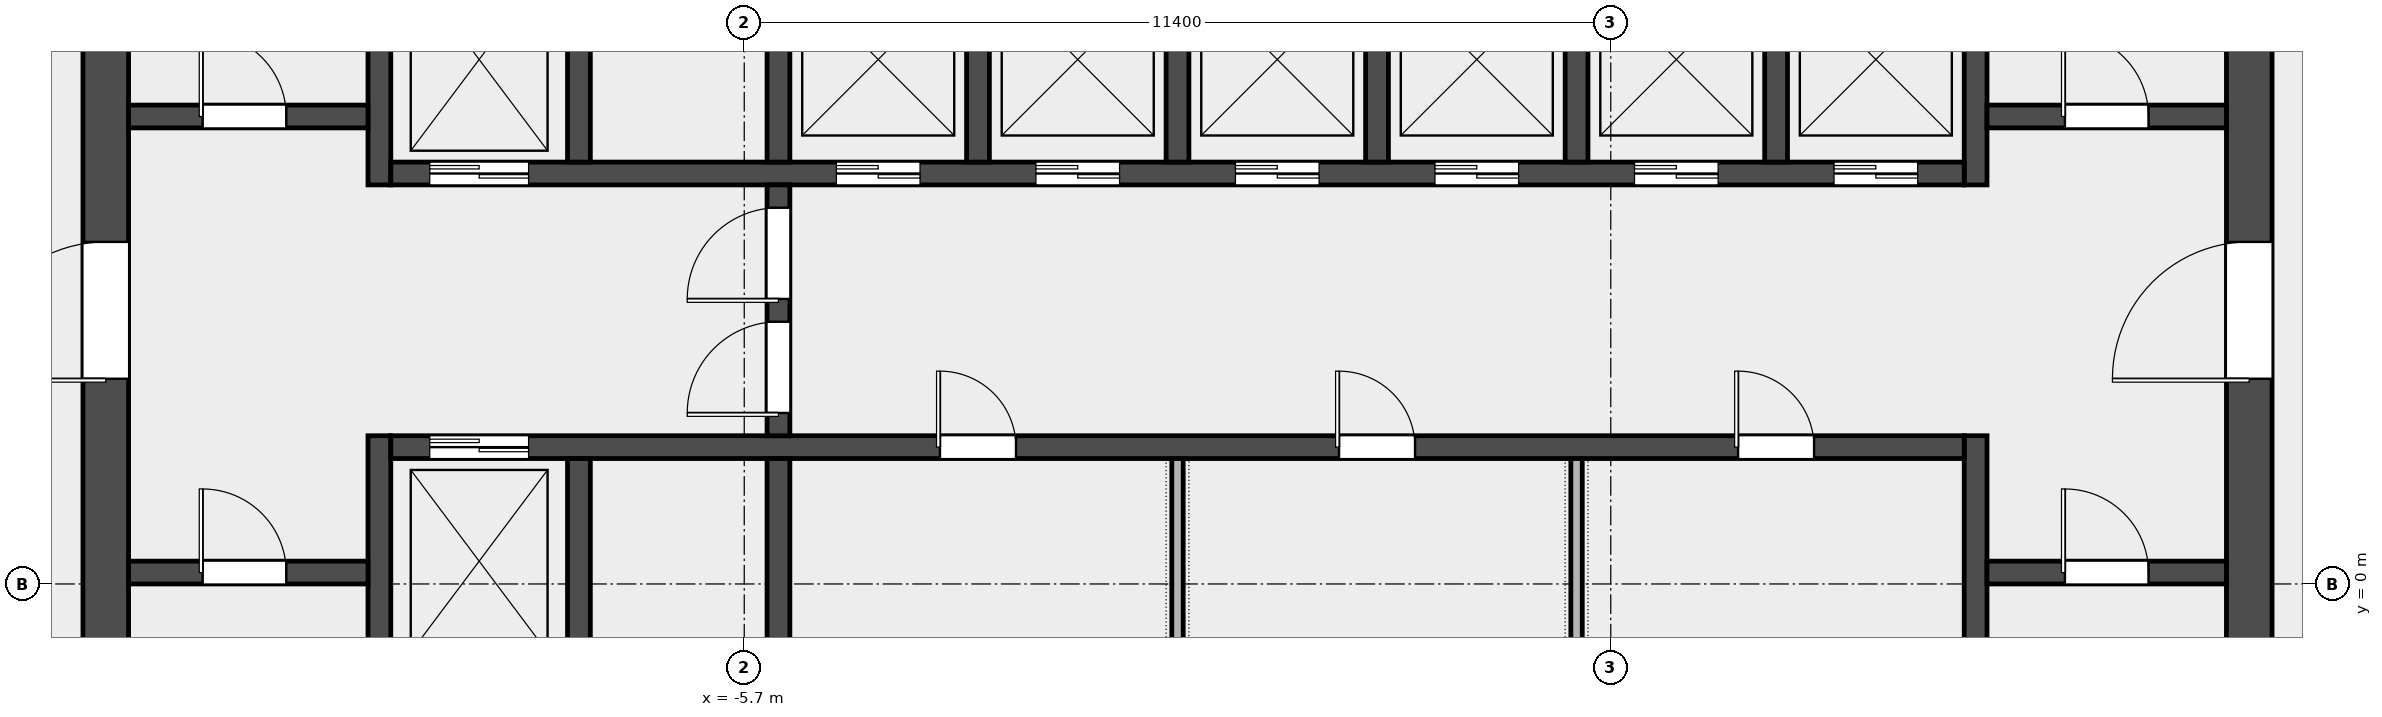
"""IFC4 building model, lengths in metres.
Left out: names, types, materials, properties, quantities, classifications, styles, units other than length and angle.
Written with IfcOpenShell. Run it as: python <this file> out.ifc"""

import sys

from ifc_helpers import new_model, si_unit, direction, frame, frame_2d, origin, place, context, subcontext, project, spatial, rectangle, extrude, element, fill, save


model = new_model("IFC4")
c1 = context("Model", 3, precision=1e-05, world=origin(), true_north=direction((0.0, 1.0)))
c2 = subcontext(c1, "Body", "Model", "MODEL_VIEW")
j1 = project(units=[si_unit("LENGTHUNIT", "METRE"), si_unit("PLANEANGLEUNIT", "RADIAN")], contexts=[c1])
p1 = place(None, origin())
s1 = spatial("IfcSite", under=j1, at=p1, CompositionType="ELEMENT")
p2 = place(p1, origin())
s2 = spatial("IfcBuilding", under=s1, at=p2, CompositionType="ELEMENT")
p3 = place(p2, frame((0.0, 0.0, 271.4)))
s3 = spatial("IfcBuildingStorey", under=s2, at=p3, CompositionType="ELEMENT", Elevation=271.4)
p4 = place(p3, frame((-14.1, -6.6, 0.0), z_axis=(0.0, 0.0, 1.0), x_axis=(0.0, 1.0, 0.0)))
e1 = element("IfcWall", 1, at=p4, inside=s3, PredefinedType="SHEAR", context=c2, shape_type="SweptSolid", body=[
    extrude(rectangle(XDim=19.5, YDim=0.6, at=frame_2d((9.75, 0.0))), origin(), (0.0, 0.0, 1.0), 3.7),
])
p5 = place(p4, frame((9.3, 0.0, 0.0)))
e2 = element("IfcOpeningElement", 2, at=p5, cuts=e1, PredefinedType="OPENING", context=c2, shape_type="SweptSolid", body=[
    extrude(rectangle(XDim=1.8, YDim=2.1, at=frame_2d((0.9, 1.05))), frame((0.0, 0.312, 0.0), z_axis=(0.0, -1.0, 0.0), x_axis=(1.0, 0.0, 0.0)), (0.0, 0.0, 1.0), 0.624),
])
p6 = place(p3, frame((14.1, -6.6, 0.0), z_axis=(0.0, 0.0, 1.0), x_axis=(0.0, 1.0, 0.0)))
e3 = element("IfcWall", 3, at=p6, inside=s3, PredefinedType="SHEAR", context=c2, shape_type="SweptSolid", body=[
    extrude(rectangle(XDim=19.5, YDim=0.6, at=frame_2d((9.75, 0.0))), origin(), (0.0, 0.0, 1.0), 3.7),
])
p7 = place(p6, frame((9.3, 0.0, 0.0)))
e4 = element("IfcOpeningElement", 4, at=p7, cuts=e3, PredefinedType="OPENING", context=c2, shape_type="SweptSolid", body=[
    extrude(rectangle(XDim=1.8, YDim=2.1, at=frame_2d((0.9, 1.05))), frame((0.0, 0.312, 0.0), z_axis=(0.0, -1.0, 0.0), x_axis=(1.0, 0.0, 0.0)), (0.0, 0.0, 1.0), 0.624),
])
p8 = place(p3, frame((-10.5, -6.6, 0.0), z_axis=(0.0, 0.0, 1.0), x_axis=(0.0, 1.0, 0.0)))
e5 = element("IfcWall", 5, at=p8, inside=s3, PredefinedType="SHEAR", context=c2, shape_type="SweptSolid", body=[
    extrude(rectangle(XDim=8.55, YDim=0.3, at=frame_2d((4.275, 0.0))), origin(), (0.0, 0.0, 1.0), 3.7),
])
p9 = place(p3, frame((-10.5, 5.25, 0.0), z_axis=(0.0, 0.0, 1.0), x_axis=(0.0, 1.0, 0.0)))
e6 = element("IfcWall", 6, at=p9, inside=s3, PredefinedType="SHEAR", context=c2, shape_type="SweptSolid", body=[
    extrude(rectangle(XDim=7.65, YDim=0.3, at=frame_2d((3.825, 0.0))), origin(), (0.0, 0.0, 1.0), 3.7),
])
p10 = place(p3, frame((10.5, -6.6, 0.0), z_axis=(0.0, 0.0, 1.0), x_axis=(0.0, 1.0, 0.0)))
e7 = element("IfcWall", 7, at=p10, inside=s3, PredefinedType="SHEAR", context=c2, shape_type="SweptSolid", body=[
    extrude(rectangle(XDim=8.55, YDim=0.3, at=frame_2d((4.275, 0.0))), origin(), (0.0, 0.0, 1.0), 3.7),
])
p11 = place(p3, frame((10.5, 5.25, 0.0), z_axis=(0.0, 0.0, 1.0), x_axis=(0.0, 1.0, 0.0)))
e8 = element("IfcWall", 8, at=p11, inside=s3, PredefinedType="SHEAR", context=c2, shape_type="SweptSolid", body=[
    extrude(rectangle(XDim=7.65, YDim=0.3, at=frame_2d((3.825, 0.0))), origin(), (0.0, 0.0, 1.0), 3.7),
])
p12 = place(p3, frame((-13.8, 0.15, 0.0), z_axis=(0.0, 0.0, 1.0), x_axis=(1.0, 0.0, 0.0)))
e9 = element("IfcWall", 9, at=p12, inside=s3, PredefinedType="SOLIDWALL", context=c2, shape_type="SweptSolid", body=[
    extrude(rectangle(XDim=3.15, YDim=0.3, at=frame_2d((1.575, 0.0))), origin(), (0.0, 0.0, 1.0), 3.7),
])
p13 = place(p12, frame((0.975, 0.0, 0.0)))
e10 = element("IfcOpeningElement", 10, at=p13, cuts=e9, PredefinedType="OPENING", context=c2, shape_type="SweptSolid", body=[
    extrude(rectangle(XDim=1.1, YDim=2.1, at=frame_2d((0.55, 1.05))), frame((0.0, 0.162, 0.0), z_axis=(0.0, -1.0, 0.0), x_axis=(1.0, 0.0, 0.0)), (0.0, 0.0, 1.0), 0.324),
])
p14 = place(p3, frame((-13.8, 6.15, 0.0), z_axis=(0.0, 0.0, 1.0), x_axis=(1.0, 0.0, 0.0)))
e11 = element("IfcWall", 11, at=p14, inside=s3, PredefinedType="SOLIDWALL", context=c2, shape_type="SweptSolid", body=[
    extrude(rectangle(XDim=3.15, YDim=0.3, at=frame_2d((1.575, 0.0))), origin(), (0.0, 0.0, 1.0), 3.7),
])
p15 = place(p14, frame((0.975, 0.0, 0.0)))
e12 = element("IfcOpeningElement", 12, at=p15, cuts=e11, PredefinedType="OPENING", context=c2, shape_type="SweptSolid", body=[
    extrude(rectangle(XDim=1.1, YDim=2.1, at=frame_2d((0.55, 1.05))), frame((0.0, 0.162, 0.0), z_axis=(0.0, -1.0, 0.0), x_axis=(1.0, 0.0, 0.0)), (0.0, 0.0, 1.0), 0.324),
])
p16 = place(p3, frame((10.65, 0.15, 0.0), z_axis=(0.0, 0.0, 1.0), x_axis=(1.0, 0.0, 0.0)))
e13 = element("IfcWall", 13, at=p16, inside=s3, PredefinedType="SOLIDWALL", context=c2, shape_type="SweptSolid", body=[
    extrude(rectangle(XDim=3.15, YDim=0.3, at=frame_2d((1.575, 0.0))), origin(), (0.0, 0.0, 1.0), 3.7),
])
p17 = place(p16, frame((1.025, 0.0, 0.0)))
e14 = element("IfcOpeningElement", 14, at=p17, cuts=e13, PredefinedType="OPENING", context=c2, shape_type="SweptSolid", body=[
    extrude(rectangle(XDim=1.1, YDim=2.1, at=frame_2d((0.55, 1.05))), frame((0.0, 0.162, 0.0), z_axis=(0.0, -1.0, 0.0), x_axis=(1.0, 0.0, 0.0)), (0.0, 0.0, 1.0), 0.324),
])
p18 = place(p3, frame((10.65, 6.15, 0.0), z_axis=(0.0, 0.0, 1.0), x_axis=(1.0, 0.0, 0.0)))
e15 = element("IfcWall", 15, at=p18, inside=s3, PredefinedType="SOLIDWALL", context=c2, shape_type="SweptSolid", body=[
    extrude(rectangle(XDim=3.15, YDim=0.3, at=frame_2d((1.575, 0.0))), origin(), (0.0, 0.0, 1.0), 3.7),
])
p19 = place(p18, frame((1.025, 0.0, 0.0)))
e16 = element("IfcOpeningElement", 16, at=p19, cuts=e15, PredefinedType="OPENING", context=c2, shape_type="SweptSolid", body=[
    extrude(rectangle(XDim=1.1, YDim=2.1, at=frame_2d((0.55, 1.05))), frame((0.0, 0.162, 0.0), z_axis=(0.0, -1.0, 0.0), x_axis=(1.0, 0.0, 0.0)), (0.0, 0.0, 1.0), 0.324),
])
p20 = place(p3, frame((-10.35, 1.8, 0.0), z_axis=(0.0, 0.0, 1.0), x_axis=(1.0, 0.0, 0.0)))
e17 = element("IfcWall", 17, at=p20, inside=s3, PredefinedType="SOLIDWALL", context=c2, shape_type="SweptSolid", body=[
    extrude(rectangle(XDim=20.7, YDim=0.3, at=frame_2d((10.35, 0.0))), origin(), (0.0, 0.0, 1.0), 3.7),
])
p21 = place(p20, frame((0.512, 0.0, 0.0)))
e18 = element("IfcOpeningElement", 18, at=p21, cuts=e17, PredefinedType="OPENING", context=c2, shape_type="SweptSolid", body=[
    extrude(rectangle(XDim=1.3, YDim=2.1, at=frame_2d((0.65, 1.05))), frame((0.0, 0.162, 0.0), z_axis=(0.0, -1.0, 0.0), x_axis=(1.0, 0.0, 0.0)), (0.0, 0.0, 1.0), 0.324),
])
p22 = place(p20, frame((7.225, 0.0, 0.0)))
e19 = element("IfcOpeningElement", 19, at=p22, cuts=e17, PredefinedType="OPENING", context=c2, shape_type="SweptSolid", body=[
    extrude(rectangle(XDim=1.0, YDim=2.1, at=frame_2d((0.5, 1.05))), frame((0.0, 0.162, 0.0), z_axis=(0.0, -1.0, 0.0), x_axis=(1.0, 0.0, 0.0)), (0.0, 0.0, 1.0), 0.324),
])
p23 = place(p20, frame((12.475, 0.0, 0.0)))
e20 = element("IfcOpeningElement", 20, at=p23, cuts=e17, PredefinedType="OPENING", context=c2, shape_type="SweptSolid", body=[
    extrude(rectangle(XDim=1.0, YDim=2.1, at=frame_2d((0.5, 1.05))), frame((0.0, 0.162, 0.0), z_axis=(0.0, -1.0, 0.0), x_axis=(1.0, 0.0, 0.0)), (0.0, 0.0, 1.0), 0.324),
])
p24 = place(p20, frame((17.725, 0.0, 0.0)))
e21 = element("IfcOpeningElement", 21, at=p24, cuts=e17, PredefinedType="OPENING", context=c2, shape_type="SweptSolid", body=[
    extrude(rectangle(XDim=1.0, YDim=2.1, at=frame_2d((0.5, 1.05))), frame((0.0, 0.162, 0.0), z_axis=(0.0, -1.0, 0.0), x_axis=(1.0, 0.0, 0.0)), (0.0, 0.0, 1.0), 0.324),
])
p25 = place(p3, frame((-10.35, 5.4, 0.0), z_axis=(0.0, 0.0, 1.0), x_axis=(1.0, 0.0, 0.0)))
e22 = element("IfcWall", 22, at=p25, inside=s3, PredefinedType="SOLIDWALL", context=c2, shape_type="SweptSolid", body=[
    extrude(rectangle(XDim=20.7, YDim=0.3, at=frame_2d((10.35, 0.0))), origin(), (0.0, 0.0, 1.0), 3.7),
])
p26 = place(p25, frame((0.512, 0.0, 0.0)))
e23 = element("IfcOpeningElement", 23, at=p26, cuts=e22, PredefinedType="OPENING", context=c2, shape_type="SweptSolid", body=[
    extrude(rectangle(XDim=1.3, YDim=2.1, at=frame_2d((0.65, 1.05))), frame((0.0, 0.162, 0.0), z_axis=(0.0, -1.0, 0.0), x_axis=(1.0, 0.0, 0.0)), (0.0, 0.0, 1.0), 0.324),
])
p27 = place(p25, frame((5.863, 0.0, 0.0)))
e24 = element("IfcOpeningElement", 24, at=p27, cuts=e22, PredefinedType="OPENING", context=c2, shape_type="SweptSolid", body=[
    extrude(rectangle(XDim=1.1, YDim=2.1, at=frame_2d((0.55, 1.05))), frame((0.0, 0.162, 0.0), z_axis=(0.0, -1.0, 0.0), x_axis=(1.0, 0.0, 0.0)), (0.0, 0.0, 1.0), 0.324),
])
p28 = place(p25, frame((8.488, 0.0, 0.0)))
e25 = element("IfcOpeningElement", 25, at=p28, cuts=e22, PredefinedType="OPENING", context=c2, shape_type="SweptSolid", body=[
    extrude(rectangle(XDim=1.1, YDim=2.1, at=frame_2d((0.55, 1.05))), frame((0.0, 0.162, 0.0), z_axis=(0.0, -1.0, 0.0), x_axis=(1.0, 0.0, 0.0)), (0.0, 0.0, 1.0), 0.324),
])
p29 = place(p25, frame((11.113, 0.0, 0.0)))
e26 = element("IfcOpeningElement", 26, at=p29, cuts=e22, PredefinedType="OPENING", context=c2, shape_type="SweptSolid", body=[
    extrude(rectangle(XDim=1.1, YDim=2.1, at=frame_2d((0.55, 1.05))), frame((0.0, 0.162, 0.0), z_axis=(0.0, -1.0, 0.0), x_axis=(1.0, 0.0, 0.0)), (0.0, 0.0, 1.0), 0.324),
])
p30 = place(p25, frame((13.738, 0.0, 0.0)))
e27 = element("IfcOpeningElement", 27, at=p30, cuts=e22, PredefinedType="OPENING", context=c2, shape_type="SweptSolid", body=[
    extrude(rectangle(XDim=1.1, YDim=2.1, at=frame_2d((0.55, 1.05))), frame((0.0, 0.162, 0.0), z_axis=(0.0, -1.0, 0.0), x_axis=(1.0, 0.0, 0.0)), (0.0, 0.0, 1.0), 0.324),
])
p31 = place(p25, frame((16.363, 0.0, 0.0)))
e28 = element("IfcOpeningElement", 28, at=p31, cuts=e22, PredefinedType="OPENING", context=c2, shape_type="SweptSolid", body=[
    extrude(rectangle(XDim=1.1, YDim=2.1, at=frame_2d((0.55, 1.05))), frame((0.0, 0.162, 0.0), z_axis=(0.0, -1.0, 0.0), x_axis=(1.0, 0.0, 0.0)), (0.0, 0.0, 1.0), 0.324),
])
p32 = place(p25, frame((18.988, 0.0, 0.0)))
e29 = element("IfcOpeningElement", 29, at=p32, cuts=e22, PredefinedType="OPENING", context=c2, shape_type="SweptSolid", body=[
    extrude(rectangle(XDim=1.1, YDim=2.1, at=frame_2d((0.55, 1.05))), frame((0.0, 0.162, 0.0), z_axis=(0.0, -1.0, 0.0), x_axis=(1.0, 0.0, 0.0)), (0.0, 0.0, 1.0), 0.324),
])
for number, where, z_axis, x_axis in (
    (30, (-7.875, -1.05, 0.0), (0.0, 0.0, 1.0), (0.0, 1.0, 0.0)),
    (31, (-5.25, -1.05, 0.0), (0.0, 0.0, 1.0), (0.0, 1.0, 0.0)),
    (32, (-7.875, 5.55, 0.0), (0.0, 0.0, 1.0), (0.0, 1.0, 0.0)),
    (33, (-5.25, 5.55, 0.0), (0.0, 0.0, 1.0), (0.0, 1.0, 0.0)),
    (34, (-2.625, 5.55, 0.0), (0.0, 0.0, 1.0), (0.0, 1.0, 0.0)),
    (35, (0.0, 5.55, 0.0), (0.0, 0.0, 1.0), (0.0, 1.0, 0.0)),
    (36, (2.625, 5.55, 0.0), (0.0, 0.0, 1.0), (0.0, 1.0, 0.0)),
    (37, (5.25, 5.55, 0.0), (0.0, 0.0, 1.0), (0.0, 1.0, 0.0)),
    (38, (7.875, 5.55, 0.0), (0.0, 0.0, 1.0), (0.0, 1.0, 0.0)),
):
    element("IfcWall", number, at=place(p3, frame(where, z_axis=z_axis, x_axis=x_axis)), inside=s3, PredefinedType="SOLIDWALL", context=c2, shape_type="SweptSolid", body=[
        extrude(rectangle(XDim=2.7, YDim=0.3, at=frame_2d((1.35, 0.0))), origin(), (0.0, 0.0, 1.0), 3.7),
    ])
p33 = place(p3, frame((-5.25, 1.95, 0.0), z_axis=(0.0, 0.0, 1.0), x_axis=(0.0, 1.0, 0.0)))
e39 = element("IfcWall", 39, at=p33, inside=s3, PredefinedType="SOLIDWALL", context=c2, shape_type="SweptSolid", body=[
    extrude(rectangle(XDim=3.3, YDim=0.3, at=frame_2d((1.65, 0.0))), origin(), (0.0, 0.0, 1.0), 3.7),
])
p34 = place(p33, frame((0.3, 0.0, 0.0)))
e40 = element("IfcOpeningElement", 40, at=p34, cuts=e39, PredefinedType="OPENING", context=c2, shape_type="SweptSolid", body=[
    extrude(rectangle(XDim=1.2, YDim=2.1, at=frame_2d((0.6, 1.05))), frame((0.0, 0.162, 0.0), z_axis=(0.0, -1.0, 0.0), x_axis=(1.0, 0.0, 0.0)), (0.0, 0.0, 1.0), 0.324),
])
p35 = place(p33, frame((1.8, 0.0, 0.0)))
e41 = element("IfcOpeningElement", 41, at=p35, cuts=e39, PredefinedType="OPENING", context=c2, shape_type="SweptSolid", body=[
    extrude(rectangle(XDim=1.2, YDim=2.1, at=frame_2d((0.6, 1.05))), frame((0.0, 0.162, 0.0), z_axis=(0.0, -1.0, 0.0), x_axis=(1.0, 0.0, 0.0)), (0.0, 0.0, 1.0), 0.324),
])
for number, where, z_axis, x_axis in (
    (42, (0.0, -1.05, 0.0), (0.0, 0.0, 1.0), (0.0, 1.0, 0.0)),
    (43, (5.25, -1.05, 0.0), (0.0, 0.0, 1.0), (0.0, 1.0, 0.0)),
):
    element("IfcWall", number, at=place(p3, frame(where, z_axis=z_axis, x_axis=x_axis)), inside=s3, PredefinedType="PARTITIONING", context=c2, shape_type="SweptSolid", body=[
        extrude(rectangle(XDim=2.7, YDim=0.15, at=frame_2d((1.35, 0.0))), origin(), (0.0, 0.0, 1.0), 3.7),
    ])
p36 = place(p13, origin())
e44 = element("IfcDoor", 44, at=p36, inside=s3, OperationType="SINGLE_SWING_LEFT", PredefinedType="DOOR", context=c2, shape_type="SweptSolid", body=[
    extrude(rectangle(XDim=1.1, YDim=2.1, at=frame_2d((0.55, 1.05))), frame((0.0, 0.025, 0.0), z_axis=(0.0, -1.0, 0.0), x_axis=(1.0, 0.0, 0.0)), (0.0, 0.0, 1.0), 0.05),
])
fill(e10, e44)
p37 = place(p15, origin())
e45 = element("IfcDoor", 45, at=p37, inside=s3, OperationType="SINGLE_SWING_LEFT", PredefinedType="DOOR", context=c2, shape_type="SweptSolid", body=[
    extrude(rectangle(XDim=1.1, YDim=2.1, at=frame_2d((0.55, 1.05))), frame((0.0, 0.025, 0.0), z_axis=(0.0, -1.0, 0.0), x_axis=(1.0, 0.0, 0.0)), (0.0, 0.0, 1.0), 0.05),
])
fill(e12, e45)
p38 = place(p17, origin())
e46 = element("IfcDoor", 46, at=p38, inside=s3, OperationType="SINGLE_SWING_RIGHT", PredefinedType="DOOR", context=c2, shape_type="SweptSolid", body=[
    extrude(rectangle(XDim=1.1, YDim=2.1, at=frame_2d((0.55, 1.05))), frame((0.0, 0.025, 0.0), z_axis=(0.0, -1.0, 0.0), x_axis=(1.0, 0.0, 0.0)), (0.0, 0.0, 1.0), 0.05),
])
fill(e14, e46)
p39 = place(p19, origin())
e47 = element("IfcDoor", 47, at=p39, inside=s3, OperationType="SINGLE_SWING_RIGHT", PredefinedType="DOOR", context=c2, shape_type="SweptSolid", body=[
    extrude(rectangle(XDim=1.1, YDim=2.1, at=frame_2d((0.55, 1.05))), frame((0.0, 0.025, 0.0), z_axis=(0.0, -1.0, 0.0), x_axis=(1.0, 0.0, 0.0)), (0.0, 0.0, 1.0), 0.05),
])
fill(e16, e47)
p40 = place(p5, origin())
e48 = element("IfcDoor", 48, at=p40, inside=s3, OperationType="DOUBLE_DOOR_SINGLE_SWING", PredefinedType="DOOR", context=c2, shape_type="SweptSolid", body=[
    extrude(rectangle(XDim=1.8, YDim=2.1, at=frame_2d((0.9, 1.05))), frame((0.0, 0.025, 0.0), z_axis=(0.0, -1.0, 0.0), x_axis=(1.0, 0.0, 0.0)), (0.0, 0.0, 1.0), 0.05),
])
fill(e2, e48)
p41 = place(p7, origin())
e49 = element("IfcDoor", 49, at=p41, inside=s3, OperationType="DOUBLE_DOOR_SINGLE_SWING", PredefinedType="DOOR", context=c2, shape_type="SweptSolid", body=[
    extrude(rectangle(XDim=1.8, YDim=2.1, at=frame_2d((0.9, 1.05))), frame((0.0, 0.025, 0.0), z_axis=(0.0, -1.0, 0.0), x_axis=(1.0, 0.0, 0.0)), (0.0, 0.0, 1.0), 0.05),
])
fill(e4, e49)
p42 = place(p34, origin())
e50 = element("IfcDoor", 50, at=p42, inside=s3, OperationType="SINGLE_SWING_LEFT", PredefinedType="DOOR", context=c2, shape_type="SweptSolid", body=[
    extrude(rectangle(XDim=1.2, YDim=2.1, at=frame_2d((0.6, 1.05))), frame((0.0, 0.025, 0.0), z_axis=(0.0, -1.0, 0.0), x_axis=(1.0, 0.0, 0.0)), (0.0, 0.0, 1.0), 0.05),
])
fill(e40, e50)
p43 = place(p35, origin())
e51 = element("IfcDoor", 51, at=p43, inside=s3, OperationType="SINGLE_SWING_RIGHT", PredefinedType="DOOR", context=c2, shape_type="SweptSolid", body=[
    extrude(rectangle(XDim=1.2, YDim=2.1, at=frame_2d((0.6, 1.05))), frame((0.0, 0.025, 0.0), z_axis=(0.0, -1.0, 0.0), x_axis=(1.0, 0.0, 0.0)), (0.0, 0.0, 1.0), 0.05),
])
fill(e41, e51)
p44 = place(p21, origin())
e52 = element("IfcDoor", 52, at=p44, inside=s3, OperationType="DOUBLE_DOOR_SLIDING", PredefinedType="DOOR", context=c2, shape_type="SweptSolid", body=[
    extrude(rectangle(XDim=1.3, YDim=2.1, at=frame_2d((0.65, 1.05))), frame((0.0, 0.025, 0.0), z_axis=(0.0, -1.0, 0.0), x_axis=(1.0, 0.0, 0.0)), (0.0, 0.0, 1.0), 0.05),
])
fill(e18, e52)
p45 = place(p26, origin())
e53 = element("IfcDoor", 53, at=p45, inside=s3, OperationType="DOUBLE_DOOR_SLIDING", PredefinedType="DOOR", context=c2, shape_type="SweptSolid", body=[
    extrude(rectangle(XDim=1.3, YDim=2.1, at=frame_2d((0.65, 1.05))), frame((0.0, 0.025, 0.0), z_axis=(0.0, -1.0, 0.0), x_axis=(1.0, 0.0, 0.0)), (0.0, 0.0, 1.0), 0.05),
])
fill(e23, e53)
p46 = place(p27, origin())
e54 = element("IfcDoor", 54, at=p46, inside=s3, OperationType="DOUBLE_DOOR_SLIDING", PredefinedType="DOOR", context=c2, shape_type="SweptSolid", body=[
    extrude(rectangle(XDim=1.1, YDim=2.1, at=frame_2d((0.55, 1.05))), frame((0.0, 0.025, 0.0), z_axis=(0.0, -1.0, 0.0), x_axis=(1.0, 0.0, 0.0)), (0.0, 0.0, 1.0), 0.05),
])
fill(e24, e54)
p47 = place(p28, origin())
e55 = element("IfcDoor", 55, at=p47, inside=s3, OperationType="DOUBLE_DOOR_SLIDING", PredefinedType="DOOR", context=c2, shape_type="SweptSolid", body=[
    extrude(rectangle(XDim=1.1, YDim=2.1, at=frame_2d((0.55, 1.05))), frame((0.0, 0.025, 0.0), z_axis=(0.0, -1.0, 0.0), x_axis=(1.0, 0.0, 0.0)), (0.0, 0.0, 1.0), 0.05),
])
fill(e25, e55)
p48 = place(p29, origin())
e56 = element("IfcDoor", 56, at=p48, inside=s3, OperationType="DOUBLE_DOOR_SLIDING", PredefinedType="DOOR", context=c2, shape_type="SweptSolid", body=[
    extrude(rectangle(XDim=1.1, YDim=2.1, at=frame_2d((0.55, 1.05))), frame((0.0, 0.025, 0.0), z_axis=(0.0, -1.0, 0.0), x_axis=(1.0, 0.0, 0.0)), (0.0, 0.0, 1.0), 0.05),
])
fill(e26, e56)
p49 = place(p30, origin())
e57 = element("IfcDoor", 57, at=p49, inside=s3, OperationType="DOUBLE_DOOR_SLIDING", PredefinedType="DOOR", context=c2, shape_type="SweptSolid", body=[
    extrude(rectangle(XDim=1.1, YDim=2.1, at=frame_2d((0.55, 1.05))), frame((0.0, 0.025, 0.0), z_axis=(0.0, -1.0, 0.0), x_axis=(1.0, 0.0, 0.0)), (0.0, 0.0, 1.0), 0.05),
])
fill(e27, e57)
p50 = place(p31, origin())
e58 = element("IfcDoor", 58, at=p50, inside=s3, OperationType="DOUBLE_DOOR_SLIDING", PredefinedType="DOOR", context=c2, shape_type="SweptSolid", body=[
    extrude(rectangle(XDim=1.1, YDim=2.1, at=frame_2d((0.55, 1.05))), frame((0.0, 0.025, 0.0), z_axis=(0.0, -1.0, 0.0), x_axis=(1.0, 0.0, 0.0)), (0.0, 0.0, 1.0), 0.05),
])
fill(e28, e58)
p51 = place(p32, origin())
e59 = element("IfcDoor", 59, at=p51, inside=s3, OperationType="DOUBLE_DOOR_SLIDING", PredefinedType="DOOR", context=c2, shape_type="SweptSolid", body=[
    extrude(rectangle(XDim=1.1, YDim=2.1, at=frame_2d((0.55, 1.05))), frame((0.0, 0.025, 0.0), z_axis=(0.0, -1.0, 0.0), x_axis=(1.0, 0.0, 0.0)), (0.0, 0.0, 1.0), 0.05),
])
fill(e29, e59)
p52 = place(p22, origin())
e60 = element("IfcDoor", 60, at=p52, inside=s3, OperationType="SINGLE_SWING_LEFT", PredefinedType="DOOR", context=c2, shape_type="SweptSolid", body=[
    extrude(rectangle(XDim=1.0, YDim=2.1, at=frame_2d((0.5, 1.05))), frame((0.0, 0.025, 0.0), z_axis=(0.0, -1.0, 0.0), x_axis=(1.0, 0.0, 0.0)), (0.0, 0.0, 1.0), 0.05),
])
fill(e19, e60)
p53 = place(p23, origin())
e61 = element("IfcDoor", 61, at=p53, inside=s3, OperationType="SINGLE_SWING_LEFT", PredefinedType="DOOR", context=c2, shape_type="SweptSolid", body=[
    extrude(rectangle(XDim=1.0, YDim=2.1, at=frame_2d((0.5, 1.05))), frame((0.0, 0.025, 0.0), z_axis=(0.0, -1.0, 0.0), x_axis=(1.0, 0.0, 0.0)), (0.0, 0.0, 1.0), 0.05),
])
fill(e20, e61)
p54 = place(p24, origin())
e62 = element("IfcDoor", 62, at=p54, inside=s3, OperationType="SINGLE_SWING_LEFT", PredefinedType="DOOR", context=c2, shape_type="SweptSolid", body=[
    extrude(rectangle(XDim=1.0, YDim=2.1, at=frame_2d((0.5, 1.05))), frame((0.0, 0.025, 0.0), z_axis=(0.0, -1.0, 0.0), x_axis=(1.0, 0.0, 0.0)), (0.0, 0.0, 1.0), 0.05),
])
fill(e21, e62)
save(model, sys.argv[1])
